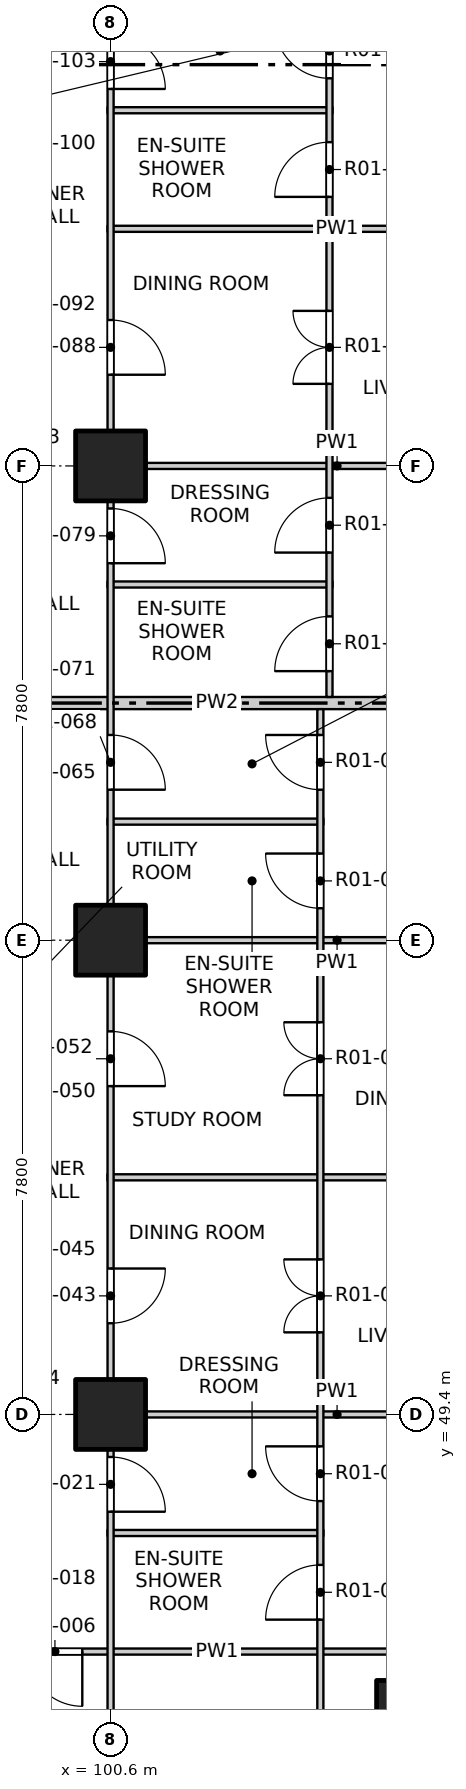
"""IFC4 building model, lengths in metres.
Left out: names, types, materials, properties, quantities, classifications, styles, units other than length and angle.
Written with IfcOpenShell. Run it as: python <this file> out.ifc"""

import sys

from ifc_helpers import new_model, si_unit, direction, frame, frame_2d, origin, origin_2d, place, context, subcontext, project, spatial, rectangle, extrude, element, fill, save


model = new_model("IFC4")
c1 = context("Model", 3, precision=1e-05, world=origin(), true_north=direction((0.0, 1.0)))
c2 = subcontext(c1, "Body", "Model", "MODEL_VIEW")
j1 = project(units=[si_unit("LENGTHUNIT", "METRE"), si_unit("PLANEANGLEUNIT", "RADIAN")], contexts=[c1])
p1 = place(None, origin())
s1 = spatial("IfcSite", under=j1, at=p1, CompositionType="ELEMENT")
p2 = place(p1, origin())
s2 = spatial("IfcBuilding", under=s1, at=p2, CompositionType="ELEMENT")
p3 = place(p2, frame((0.0, 0.0, 19.5)))
s3 = spatial("IfcBuildingStorey", under=s2, at=p3, CompositionType="ELEMENT", Elevation=19.5)
p4 = place(p3, frame((105.5, 44.5, -0.25), z_axis=(0.0, 0.0, 1.0), x_axis=(1.0, 0.0, 0.0)))
e1 = element("IfcColumn", 1, at=p4, inside=s3, PredefinedType="COLUMN", context=c2, shape_type="SweptSolid", body=[
    extrude(rectangle(XDim=1.05, YDim=1.05, at=origin_2d()), origin(), (0.0, 0.0, 1.0), 3.4),
])
for number, where, z_axis, x_axis in (
    (2, (100.6, 49.4, -0.25), (0.0, 0.0, 1.0), (1.0, 0.0, 0.0)),
    (3, (100.6, 57.2, -0.25), (0.0, 0.0, 1.0), (1.0, 0.0, 0.0)),
    (4, (100.6, 65.0, -0.25), (0.0, 0.0, 1.0), (1.0, 0.0, 0.0)),
):
    element("IfcColumn", number, at=place(p3, frame(where, z_axis=z_axis, x_axis=x_axis)), inside=s3, PredefinedType="COLUMN", context=c2, shape_type="SweptSolid", body=[
        extrude(rectangle(XDim=1.15, YDim=1.15, at=origin_2d()), origin(), (0.0, 0.0, 1.0), 3.4),
    ])
p5 = place(p3, frame((96.6, 45.5, 0.0), z_axis=(0.0, 0.0, 1.0), x_axis=(1.0, 0.0, 0.0)))
e5 = element("IfcWall", 5, at=p5, inside=s3, PredefinedType="PARTITIONING", context=c2, shape_type="SweptSolid", body=[
    extrude(rectangle(XDim=11.5, YDim=0.1, at=frame_2d((5.75, 0.0))), origin(), (0.0, 0.0, 1.0), 3.15),
])
p6 = place(p5, frame((2.635, 0.0, 0.0)))
e6 = element("IfcOpeningElement", 6, at=p6, cuts=e5, PredefinedType="OPENING", context=c2, shape_type="SweptSolid", body=[
    extrude(rectangle(XDim=0.9, YDim=2.1, at=frame_2d((0.45, 1.05))), frame((0.0, 0.06, 0.0), z_axis=(0.0, -1.0, 0.0), x_axis=(1.0, 0.0, 0.0)), (0.0, 0.0, 1.0), 0.12),
])
p7 = place(p3, frame((100.55, 47.45, 0.0), z_axis=(0.0, 0.0, 1.0), x_axis=(1.0, 0.0, 0.0)))
e7 = element("IfcWall", 7, at=p7, inside=s3, PredefinedType="PARTITIONING", context=c2, shape_type="SweptSolid", body=[
    extrude(rectangle(XDim=3.55, YDim=0.1, at=frame_2d((1.775, 0.0))), origin(), (0.0, 0.0, 1.0), 3.15),
])
p8 = place(p3, frame((100.55, 49.4, 0.0), z_axis=(0.0, 0.0, 1.0), x_axis=(1.0, 0.0, 0.0)))
e8 = element("IfcWall", 8, at=p8, inside=s3, PredefinedType="PARTITIONING", context=c2, shape_type="SweptSolid", body=[
    extrude(rectangle(XDim=7.55, YDim=0.1, at=frame_2d((3.775, 0.0))), origin(), (0.0, 0.0, 1.0), 2.55),
])
p9 = place(p3, frame((100.55, 53.3, 0.0), z_axis=(0.0, 0.0, 1.0), x_axis=(1.0, 0.0, 0.0)))
e9 = element("IfcWall", 9, at=p9, inside=s3, PredefinedType="PARTITIONING", context=c2, shape_type="SweptSolid", body=[
    extrude(rectangle(XDim=7.55, YDim=0.1, at=frame_2d((3.775, 0.0))), origin(), (0.0, 0.0, 1.0), 3.15),
])
p10 = place(p3, frame((100.55, 57.2, 0.0), z_axis=(0.0, 0.0, 1.0), x_axis=(1.0, 0.0, 0.0)))
e10 = element("IfcWall", 10, at=p10, inside=s3, PredefinedType="PARTITIONING", context=c2, shape_type="SweptSolid", body=[
    extrude(rectangle(XDim=7.55, YDim=0.1, at=frame_2d((3.775, 0.0))), origin(), (0.0, 0.0, 1.0), 2.55),
])
p11 = place(p3, frame((100.55, 59.15, 0.0), z_axis=(0.0, 0.0, 1.0), x_axis=(1.0, 0.0, 0.0)))
e11 = element("IfcWall", 11, at=p11, inside=s3, PredefinedType="PARTITIONING", context=c2, shape_type="SweptSolid", body=[
    extrude(rectangle(XDim=3.55, YDim=0.1, at=frame_2d((1.775, 0.0))), origin(), (0.0, 0.0, 1.0), 3.15),
])
p12 = place(p3, frame((96.6, 61.1, 0.0), z_axis=(0.0, 0.0, 1.0), x_axis=(1.0, 0.0, 0.0)))
e12 = element("IfcWall", 12, at=p12, inside=s3, PredefinedType="PARTITIONING", context=c2, shape_type="SweptSolid", body=[
    extrude(rectangle(XDim=11.5, YDim=0.2, at=frame_2d((5.75, 0.0))), origin(), (0.0, 0.0, 1.0), 3.15),
])
p13 = place(p3, frame((100.55, 63.05, 0.0), z_axis=(0.0, 0.0, 1.0), x_axis=(1.0, 0.0, 0.0)))
e13 = element("IfcWall", 13, at=p13, inside=s3, PredefinedType="PARTITIONING", context=c2, shape_type="SweptSolid", body=[
    extrude(rectangle(XDim=3.7, YDim=0.1, at=frame_2d((1.85, 0.0))), origin(), (0.0, 0.0, 1.0), 3.15),
])
p14 = place(p3, frame((100.55, 65.0, 0.0), z_axis=(0.0, 0.0, 1.0), x_axis=(1.0, 0.0, 0.0)))
e14 = element("IfcWall", 14, at=p14, inside=s3, PredefinedType="PARTITIONING", context=c2, shape_type="SweptSolid", body=[
    extrude(rectangle(XDim=7.55, YDim=0.1, at=frame_2d((3.775, 0.0))), origin(), (0.0, 0.0, 1.0), 2.55),
])
p15 = place(p3, frame((100.55, 68.9, 0.0), z_axis=(0.0, 0.0, 1.0), x_axis=(1.0, 0.0, 0.0)))
e15 = element("IfcWall", 15, at=p15, inside=s3, PredefinedType="PARTITIONING", context=c2, shape_type="SweptSolid", body=[
    extrude(rectangle(XDim=7.55, YDim=0.1, at=frame_2d((3.775, 0.0))), origin(), (0.0, 0.0, 1.0), 3.15),
])
p16 = place(p3, frame((100.55, 70.85, 0.0), z_axis=(0.0, 0.0, 1.0), x_axis=(1.0, 0.0, 0.0)))
e16 = element("IfcWall", 16, at=p16, inside=s3, PredefinedType="PARTITIONING", context=c2, shape_type="SweptSolid", body=[
    extrude(rectangle(XDim=3.7, YDim=0.1, at=frame_2d((1.85, 0.0))), origin(), (0.0, 0.0, 1.0), 3.15),
])
p17 = place(p3, frame((100.6, 41.9, 0.0), z_axis=(0.0, 0.0, 1.0), x_axis=(0.0, 1.0, 0.0)))
e17 = element("IfcWall", 17, at=p17, inside=s3, PredefinedType="PARTITIONING", context=c2, shape_type="SweptSolid", body=[
    extrude(rectangle(XDim=7.5, YDim=0.1, at=frame_2d((3.75, 0.0))), origin(), (0.0, 0.0, 1.0), 2.55),
])
p18 = place(p17, frame((1.2, 0.0, 0.0)))
e18 = element("IfcOpeningElement", 18, at=p18, cuts=e17, PredefinedType="OPENING", context=c2, shape_type="SweptSolid", body=[
    extrude(rectangle(XDim=0.9, YDim=2.1, at=frame_2d((0.45, 1.05))), frame((0.0, 0.06, 0.0), z_axis=(0.0, -1.0, 0.0), x_axis=(1.0, 0.0, 0.0)), (0.0, 0.0, 1.0), 0.12),
])
p19 = place(p17, frame((5.9, 0.0, 0.0)))
e19 = element("IfcOpeningElement", 19, at=p19, cuts=e17, PredefinedType="OPENING", context=c2, shape_type="SweptSolid", body=[
    extrude(rectangle(XDim=0.9, YDim=2.1, at=frame_2d((0.45, 1.05))), frame((0.0, 0.06, 0.0), z_axis=(0.0, -1.0, 0.0), x_axis=(1.0, 0.0, 0.0)), (0.0, 0.0, 1.0), 0.12),
])
p20 = place(p3, frame((100.6, 49.4, 0.0), z_axis=(0.0, 0.0, 1.0), x_axis=(0.0, 1.0, 0.0)))
e20 = element("IfcWall", 20, at=p20, inside=s3, PredefinedType="PARTITIONING", context=c2, shape_type="SweptSolid", body=[
    extrude(rectangle(XDim=31.2, YDim=0.1, at=frame_2d((15.6, 0.0))), origin(), (0.0, 0.0, 1.0), 3.15),
])
p21 = place(p20, frame((1.5, 0.0, 0.0)))
e21 = element("IfcOpeningElement", 21, at=p21, cuts=e20, PredefinedType="OPENING", context=c2, shape_type="SweptSolid", body=[
    extrude(rectangle(XDim=0.9, YDim=2.1, at=frame_2d((0.45, 1.05))), frame((0.0, 0.06, 0.0), z_axis=(0.0, -1.0, 0.0), x_axis=(1.0, 0.0, 0.0)), (0.0, 0.0, 1.0), 0.12),
])
p22 = place(p20, frame((5.4, 0.0, 0.0)))
e22 = element("IfcOpeningElement", 22, at=p22, cuts=e20, PredefinedType="OPENING", context=c2, shape_type="SweptSolid", body=[
    extrude(rectangle(XDim=0.9, YDim=2.1, at=frame_2d((0.45, 1.05))), frame((0.0, 0.06, 0.0), z_axis=(0.0, -1.0, 0.0), x_axis=(1.0, 0.0, 0.0)), (0.0, 0.0, 1.0), 0.12),
])
p23 = place(p20, frame((10.275, 0.0, 0.0)))
e23 = element("IfcOpeningElement", 23, at=p23, cuts=e20, PredefinedType="OPENING", context=c2, shape_type="SweptSolid", body=[
    extrude(rectangle(XDim=0.9, YDim=2.1, at=frame_2d((0.45, 1.05))), frame((0.0, 0.06, 0.0), z_axis=(0.0, -1.0, 0.0), x_axis=(1.0, 0.0, 0.0)), (0.0, 0.0, 1.0), 0.12),
])
p24 = place(p20, frame((14.0, 0.0, 0.0)))
e24 = element("IfcOpeningElement", 24, at=p24, cuts=e20, PredefinedType="OPENING", context=c2, shape_type="SweptSolid", body=[
    extrude(rectangle(XDim=0.9, YDim=2.1, at=frame_2d((0.45, 1.05))), frame((0.0, 0.06, 0.0), z_axis=(0.0, -1.0, 0.0), x_axis=(1.0, 0.0, 0.0)), (0.0, 0.0, 1.0), 0.12),
])
p25 = place(p20, frame((17.1, 0.0, 0.0)))
e25 = element("IfcOpeningElement", 25, at=p25, cuts=e20, PredefinedType="OPENING", context=c2, shape_type="SweptSolid", body=[
    extrude(rectangle(XDim=0.9, YDim=2.1, at=frame_2d((0.45, 1.05))), frame((0.0, 0.06, 0.0), z_axis=(0.0, -1.0, 0.0), x_axis=(1.0, 0.0, 0.0)), (0.0, 0.0, 1.0), 0.12),
])
p26 = place(p20, frame((21.8, 0.0, 0.0)))
e26 = element("IfcOpeningElement", 26, at=p26, cuts=e20, PredefinedType="OPENING", context=c2, shape_type="SweptSolid", body=[
    extrude(rectangle(XDim=0.9, YDim=2.1, at=frame_2d((0.45, 1.05))), frame((0.0, 0.06, 0.0), z_axis=(0.0, -1.0, 0.0), x_axis=(1.0, 0.0, 0.0)), (0.0, 0.0, 1.0), 0.12),
])
p27 = place(p20, frame((24.9, 0.0, 0.0)))
e27 = element("IfcOpeningElement", 27, at=p27, cuts=e20, PredefinedType="OPENING", context=c2, shape_type="SweptSolid", body=[
    extrude(rectangle(XDim=0.9, YDim=2.1, at=frame_2d((0.45, 1.05))), frame((0.0, 0.06, 0.0), z_axis=(0.0, -1.0, 0.0), x_axis=(1.0, 0.0, 0.0)), (0.0, 0.0, 1.0), 0.12),
])
p28 = place(p20, frame((28.8, 0.0, 0.0)))
e28 = element("IfcOpeningElement", 28, at=p28, cuts=e20, PredefinedType="OPENING", context=c2, shape_type="SweptSolid", body=[
    extrude(rectangle(XDim=0.9, YDim=2.1, at=frame_2d((0.45, 1.05))), frame((0.0, 0.06, 0.0), z_axis=(0.0, -1.0, 0.0), x_axis=(1.0, 0.0, 0.0)), (0.0, 0.0, 1.0), 0.12),
])
p29 = place(p3, frame((104.05, 41.9, 0.0), z_axis=(0.0, 0.0, 1.0), x_axis=(0.0, 1.0, 0.0)))
e29 = element("IfcWall", 29, at=p29, inside=s3, PredefinedType="PARTITIONING", context=c2, shape_type="SweptSolid", body=[
    extrude(rectangle(XDim=19.1, YDim=0.1, at=frame_2d((9.55, 0.0))), origin(), (0.0, 0.0, 1.0), 3.15),
])
p30 = place(p29, frame((1.05, 0.0, 0.0)))
e30 = element("IfcOpeningElement", 30, at=p30, cuts=e29, PredefinedType="OPENING", context=c2, shape_type="SweptSolid", body=[
    extrude(rectangle(XDim=1.2, YDim=2.1, at=frame_2d((0.6, 1.05))), frame((0.0, 0.06, 0.0), z_axis=(0.0, -1.0, 0.0), x_axis=(1.0, 0.0, 0.0)), (0.0, 0.0, 1.0), 0.12),
])
p31 = place(p29, frame((4.125, 0.0, 0.0)))
e31 = element("IfcOpeningElement", 31, at=p31, cuts=e29, PredefinedType="OPENING", context=c2, shape_type="SweptSolid", body=[
    extrude(rectangle(XDim=0.9, YDim=2.1, at=frame_2d((0.45, 1.05))), frame((0.0, 0.06, 0.0), z_axis=(0.0, -1.0, 0.0), x_axis=(1.0, 0.0, 0.0)), (0.0, 0.0, 1.0), 0.12),
])
p32 = place(p29, frame((6.075, 0.0, 0.0)))
e32 = element("IfcOpeningElement", 32, at=p32, cuts=e29, PredefinedType="OPENING", context=c2, shape_type="SweptSolid", body=[
    extrude(rectangle(XDim=0.9, YDim=2.1, at=frame_2d((0.45, 1.05))), frame((0.0, 0.06, 0.0), z_axis=(0.0, -1.0, 0.0), x_axis=(1.0, 0.0, 0.0)), (0.0, 0.0, 1.0), 0.12),
])
p33 = place(p29, frame((8.85, 0.0, 0.0)))
e33 = element("IfcOpeningElement", 33, at=p33, cuts=e29, PredefinedType="OPENING", context=c2, shape_type="SweptSolid", body=[
    extrude(rectangle(XDim=1.2, YDim=2.1, at=frame_2d((0.6, 1.05))), frame((0.0, 0.06, 0.0), z_axis=(0.0, -1.0, 0.0), x_axis=(1.0, 0.0, 0.0)), (0.0, 0.0, 1.0), 0.12),
])
p34 = place(p29, frame((12.75, 0.0, 0.0)))
e34 = element("IfcOpeningElement", 34, at=p34, cuts=e29, PredefinedType="OPENING", context=c2, shape_type="SweptSolid", body=[
    extrude(rectangle(XDim=1.2, YDim=2.1, at=frame_2d((0.6, 1.05))), frame((0.0, 0.06, 0.0), z_axis=(0.0, -1.0, 0.0), x_axis=(1.0, 0.0, 0.0)), (0.0, 0.0, 1.0), 0.12),
])
p35 = place(p29, frame((15.825, 0.0, 0.0)))
e35 = element("IfcOpeningElement", 35, at=p35, cuts=e29, PredefinedType="OPENING", context=c2, shape_type="SweptSolid", body=[
    extrude(rectangle(XDim=0.9, YDim=2.1, at=frame_2d((0.45, 1.05))), frame((0.0, 0.06, 0.0), z_axis=(0.0, -1.0, 0.0), x_axis=(1.0, 0.0, 0.0)), (0.0, 0.0, 1.0), 0.12),
])
p36 = place(p29, frame((17.775, 0.0, 0.0)))
e36 = element("IfcOpeningElement", 36, at=p36, cuts=e29, PredefinedType="OPENING", context=c2, shape_type="SweptSolid", body=[
    extrude(rectangle(XDim=0.9, YDim=2.1, at=frame_2d((0.45, 1.05))), frame((0.0, 0.06, 0.0), z_axis=(0.0, -1.0, 0.0), x_axis=(1.0, 0.0, 0.0)), (0.0, 0.0, 1.0), 0.12),
])
p37 = place(p3, frame((104.2, 61.2, 0.0), z_axis=(0.0, 0.0, 1.0), x_axis=(0.0, 1.0, 0.0)))
e37 = element("IfcWall", 37, at=p37, inside=s3, PredefinedType="PARTITIONING", context=c2, shape_type="SweptSolid", body=[
    extrude(rectangle(XDim=15.4, YDim=0.1, at=frame_2d((7.7, 0.0))), origin(), (0.0, 0.0, 1.0), 3.15),
])
p38 = place(p37, frame((0.425, 0.0, 0.0)))
e38 = element("IfcOpeningElement", 38, at=p38, cuts=e37, PredefinedType="OPENING", context=c2, shape_type="SweptSolid", body=[
    extrude(rectangle(XDim=0.9, YDim=2.1, at=frame_2d((0.45, 1.05))), frame((0.0, 0.06, 0.0), z_axis=(0.0, -1.0, 0.0), x_axis=(1.0, 0.0, 0.0)), (0.0, 0.0, 1.0), 0.12),
])
p39 = place(p37, frame((2.375, 0.0, 0.0)))
e39 = element("IfcOpeningElement", 39, at=p39, cuts=e37, PredefinedType="OPENING", context=c2, shape_type="SweptSolid", body=[
    extrude(rectangle(XDim=0.9, YDim=2.1, at=frame_2d((0.45, 1.05))), frame((0.0, 0.06, 0.0), z_axis=(0.0, -1.0, 0.0), x_axis=(1.0, 0.0, 0.0)), (0.0, 0.0, 1.0), 0.12),
])
p40 = place(p37, frame((5.15, 0.0, 0.0)))
e40 = element("IfcOpeningElement", 40, at=p40, cuts=e37, PredefinedType="OPENING", context=c2, shape_type="SweptSolid", body=[
    extrude(rectangle(XDim=1.2, YDim=2.1, at=frame_2d((0.6, 1.05))), frame((0.0, 0.06, 0.0), z_axis=(0.0, -1.0, 0.0), x_axis=(1.0, 0.0, 0.0)), (0.0, 0.0, 1.0), 0.12),
])
p41 = place(p37, frame((8.225, 0.0, 0.0)))
e41 = element("IfcOpeningElement", 41, at=p41, cuts=e37, PredefinedType="OPENING", context=c2, shape_type="SweptSolid", body=[
    extrude(rectangle(XDim=0.9, YDim=2.1, at=frame_2d((0.45, 1.05))), frame((0.0, 0.06, 0.0), z_axis=(0.0, -1.0, 0.0), x_axis=(1.0, 0.0, 0.0)), (0.0, 0.0, 1.0), 0.12),
])
p42 = place(p37, frame((10.175, 0.0, 0.0)))
e42 = element("IfcOpeningElement", 42, at=p42, cuts=e37, PredefinedType="OPENING", context=c2, shape_type="SweptSolid", body=[
    extrude(rectangle(XDim=0.9, YDim=2.1, at=frame_2d((0.45, 1.05))), frame((0.0, 0.06, 0.0), z_axis=(0.0, -1.0, 0.0), x_axis=(1.0, 0.0, 0.0)), (0.0, 0.0, 1.0), 0.12),
])
p43 = place(p37, frame((12.95, 0.0, 0.0)))
e43 = element("IfcOpeningElement", 43, at=p43, cuts=e37, PredefinedType="OPENING", context=c2, shape_type="SweptSolid", body=[
    extrude(rectangle(XDim=1.2, YDim=2.1, at=frame_2d((0.6, 1.05))), frame((0.0, 0.06, 0.0), z_axis=(0.0, -1.0, 0.0), x_axis=(1.0, 0.0, 0.0)), (0.0, 0.0, 1.0), 0.12),
])
p44 = place(p6, origin())
e44 = element("IfcDoor", 44, at=p44, inside=s3, OperationType="SINGLE_SWING_LEFT", PredefinedType="DOOR", context=c2, shape_type="SweptSolid", body=[
    extrude(rectangle(XDim=0.9, YDim=2.1, at=frame_2d((0.45, 1.05))), frame((0.0, 0.025, 0.0), z_axis=(0.0, -1.0, 0.0), x_axis=(1.0, 0.0, 0.0)), (0.0, 0.0, 1.0), 0.05),
])
fill(e6, e44)
p45 = place(p31, origin())
e45 = element("IfcDoor", 45, at=p45, inside=s3, OperationType="SINGLE_SWING_LEFT", PredefinedType="DOOR", context=c2, shape_type="SweptSolid", body=[
    extrude(rectangle(XDim=0.9, YDim=2.1, at=frame_2d((0.45, 1.05))), frame((0.0, 0.025, 0.0), z_axis=(0.0, -1.0, 0.0), x_axis=(1.0, 0.0, 0.0)), (0.0, 0.0, 1.0), 0.05),
])
fill(e31, e45)
p46 = place(p19, origin())
e46 = element("IfcDoor", 46, at=p46, inside=s3, OperationType="SINGLE_SWING_RIGHT", PredefinedType="DOOR", context=c2, shape_type="SweptSolid", body=[
    extrude(rectangle(XDim=0.9, YDim=2.1, at=frame_2d((0.45, 1.05))), frame((0.0, 0.025, 0.0), z_axis=(0.0, -1.0, 0.0), x_axis=(1.0, 0.0, 0.0)), (0.0, 0.0, 1.0), 0.05),
])
fill(e19, e46)
p47 = place(p32, origin())
e47 = element("IfcDoor", 47, at=p47, inside=s3, OperationType="SINGLE_SWING_RIGHT", PredefinedType="DOOR", context=c2, shape_type="SweptSolid", body=[
    extrude(rectangle(XDim=0.9, YDim=2.1, at=frame_2d((0.45, 1.05))), frame((0.0, 0.025, 0.0), z_axis=(0.0, -1.0, 0.0), x_axis=(1.0, 0.0, 0.0)), (0.0, 0.0, 1.0), 0.05),
])
fill(e32, e47)
p48 = place(p21, origin())
e48 = element("IfcDoor", 48, at=p48, inside=s3, OperationType="SINGLE_SWING_LEFT", PredefinedType="DOOR", context=c2, shape_type="SweptSolid", body=[
    extrude(rectangle(XDim=0.9, YDim=2.1, at=frame_2d((0.45, 1.05))), frame((0.0, 0.025, 0.0), z_axis=(0.0, -1.0, 0.0), x_axis=(1.0, 0.0, 0.0)), (0.0, 0.0, 1.0), 0.05),
])
fill(e21, e48)
p49 = place(p33, origin())
e49 = element("IfcDoor", 49, at=p49, inside=s3, OperationType="DOUBLE_DOOR_SINGLE_SWING", PredefinedType="DOOR", context=c2, shape_type="SweptSolid", body=[
    extrude(rectangle(XDim=1.2, YDim=2.1, at=frame_2d((0.6, 1.05))), frame((0.0, 0.025, 0.0), z_axis=(0.0, -1.0, 0.0), x_axis=(1.0, 0.0, 0.0)), (0.0, 0.0, 1.0), 0.05),
])
fill(e33, e49)
p50 = place(p22, origin())
e50 = element("IfcDoor", 50, at=p50, inside=s3, OperationType="SINGLE_SWING_RIGHT", PredefinedType="DOOR", context=c2, shape_type="SweptSolid", body=[
    extrude(rectangle(XDim=0.9, YDim=2.1, at=frame_2d((0.45, 1.05))), frame((0.0, 0.025, 0.0), z_axis=(0.0, -1.0, 0.0), x_axis=(1.0, 0.0, 0.0)), (0.0, 0.0, 1.0), 0.05),
])
fill(e22, e50)
p51 = place(p34, origin())
e51 = element("IfcDoor", 51, at=p51, inside=s3, OperationType="DOUBLE_DOOR_SINGLE_SWING", PredefinedType="DOOR", context=c2, shape_type="SweptSolid", body=[
    extrude(rectangle(XDim=1.2, YDim=2.1, at=frame_2d((0.6, 1.05))), frame((0.0, 0.025, 0.0), z_axis=(0.0, -1.0, 0.0), x_axis=(1.0, 0.0, 0.0)), (0.0, 0.0, 1.0), 0.05),
])
fill(e34, e51)
p52 = place(p35, origin())
e52 = element("IfcDoor", 52, at=p52, inside=s3, OperationType="SINGLE_SWING_RIGHT", PredefinedType="DOOR", context=c2, shape_type="SweptSolid", body=[
    extrude(rectangle(XDim=0.9, YDim=2.1, at=frame_2d((0.45, 1.05))), frame((0.0, 0.025, 0.0), z_axis=(0.0, -1.0, 0.0), x_axis=(1.0, 0.0, 0.0)), (0.0, 0.0, 1.0), 0.05),
])
fill(e35, e52)
p53 = place(p23, origin())
e53 = element("IfcDoor", 53, at=p53, inside=s3, OperationType="SINGLE_SWING_RIGHT", PredefinedType="DOOR", context=c2, shape_type="SweptSolid", body=[
    extrude(rectangle(XDim=0.9, YDim=2.1, at=frame_2d((0.45, 1.05))), frame((0.0, 0.025, 0.0), z_axis=(0.0, -1.0, 0.0), x_axis=(1.0, 0.0, 0.0)), (0.0, 0.0, 1.0), 0.05),
])
fill(e23, e53)
p54 = place(p36, origin())
e54 = element("IfcDoor", 54, at=p54, inside=s3, OperationType="SINGLE_SWING_RIGHT", PredefinedType="DOOR", context=c2, shape_type="SweptSolid", body=[
    extrude(rectangle(XDim=0.9, YDim=2.1, at=frame_2d((0.45, 1.05))), frame((0.0, 0.025, 0.0), z_axis=(0.0, -1.0, 0.0), x_axis=(1.0, 0.0, 0.0)), (0.0, 0.0, 1.0), 0.05),
])
fill(e36, e54)
p55 = place(p38, origin())
e55 = element("IfcDoor", 55, at=p55, inside=s3, OperationType="SINGLE_SWING_LEFT", PredefinedType="DOOR", context=c2, shape_type="SweptSolid", body=[
    extrude(rectangle(XDim=0.9, YDim=2.1, at=frame_2d((0.45, 1.05))), frame((0.0, 0.025, 0.0), z_axis=(0.0, -1.0, 0.0), x_axis=(1.0, 0.0, 0.0)), (0.0, 0.0, 1.0), 0.05),
])
fill(e38, e55)
p56 = place(p24, origin())
e56 = element("IfcDoor", 56, at=p56, inside=s3, OperationType="SINGLE_SWING_RIGHT", PredefinedType="DOOR", context=c2, shape_type="SweptSolid", body=[
    extrude(rectangle(XDim=0.9, YDim=2.1, at=frame_2d((0.45, 1.05))), frame((0.0, 0.025, 0.0), z_axis=(0.0, -1.0, 0.0), x_axis=(1.0, 0.0, 0.0)), (0.0, 0.0, 1.0), 0.05),
])
fill(e24, e56)
p57 = place(p39, origin())
e57 = element("IfcDoor", 57, at=p57, inside=s3, OperationType="SINGLE_SWING_LEFT", PredefinedType="DOOR", context=c2, shape_type="SweptSolid", body=[
    extrude(rectangle(XDim=0.9, YDim=2.1, at=frame_2d((0.45, 1.05))), frame((0.0, 0.025, 0.0), z_axis=(0.0, -1.0, 0.0), x_axis=(1.0, 0.0, 0.0)), (0.0, 0.0, 1.0), 0.05),
])
fill(e39, e57)
p58 = place(p25, origin())
e58 = element("IfcDoor", 58, at=p58, inside=s3, OperationType="SINGLE_SWING_RIGHT", PredefinedType="DOOR", context=c2, shape_type="SweptSolid", body=[
    extrude(rectangle(XDim=0.9, YDim=2.1, at=frame_2d((0.45, 1.05))), frame((0.0, 0.025, 0.0), z_axis=(0.0, -1.0, 0.0), x_axis=(1.0, 0.0, 0.0)), (0.0, 0.0, 1.0), 0.05),
])
fill(e25, e58)
p59 = place(p40, origin())
e59 = element("IfcDoor", 59, at=p59, inside=s3, OperationType="DOUBLE_DOOR_SINGLE_SWING", PredefinedType="DOOR", context=c2, shape_type="SweptSolid", body=[
    extrude(rectangle(XDim=1.2, YDim=2.1, at=frame_2d((0.6, 1.05))), frame((0.0, 0.025, 0.0), z_axis=(0.0, -1.0, 0.0), x_axis=(1.0, 0.0, 0.0)), (0.0, 0.0, 1.0), 0.05),
])
fill(e40, e59)
p60 = place(p41, origin())
e60 = element("IfcDoor", 60, at=p60, inside=s3, OperationType="SINGLE_SWING_LEFT", PredefinedType="DOOR", context=c2, shape_type="SweptSolid", body=[
    extrude(rectangle(XDim=0.9, YDim=2.1, at=frame_2d((0.45, 1.05))), frame((0.0, 0.025, 0.0), z_axis=(0.0, -1.0, 0.0), x_axis=(1.0, 0.0, 0.0)), (0.0, 0.0, 1.0), 0.05),
])
fill(e41, e60)
p61 = place(p26, origin())
e61 = element("IfcDoor", 61, at=p61, inside=s3, OperationType="SINGLE_SWING_RIGHT", PredefinedType="DOOR", context=c2, shape_type="SweptSolid", body=[
    extrude(rectangle(XDim=0.9, YDim=2.1, at=frame_2d((0.45, 1.05))), frame((0.0, 0.025, 0.0), z_axis=(0.0, -1.0, 0.0), x_axis=(1.0, 0.0, 0.0)), (0.0, 0.0, 1.0), 0.05),
])
fill(e26, e61)
p62 = place(p42, origin())
e62 = element("IfcDoor", 62, at=p62, inside=s3, OperationType="SINGLE_SWING_RIGHT", PredefinedType="DOOR", context=c2, shape_type="SweptSolid", body=[
    extrude(rectangle(XDim=0.9, YDim=2.1, at=frame_2d((0.45, 1.05))), frame((0.0, 0.025, 0.0), z_axis=(0.0, -1.0, 0.0), x_axis=(1.0, 0.0, 0.0)), (0.0, 0.0, 1.0), 0.05),
])
fill(e42, e62)
save(model, sys.argv[1])
